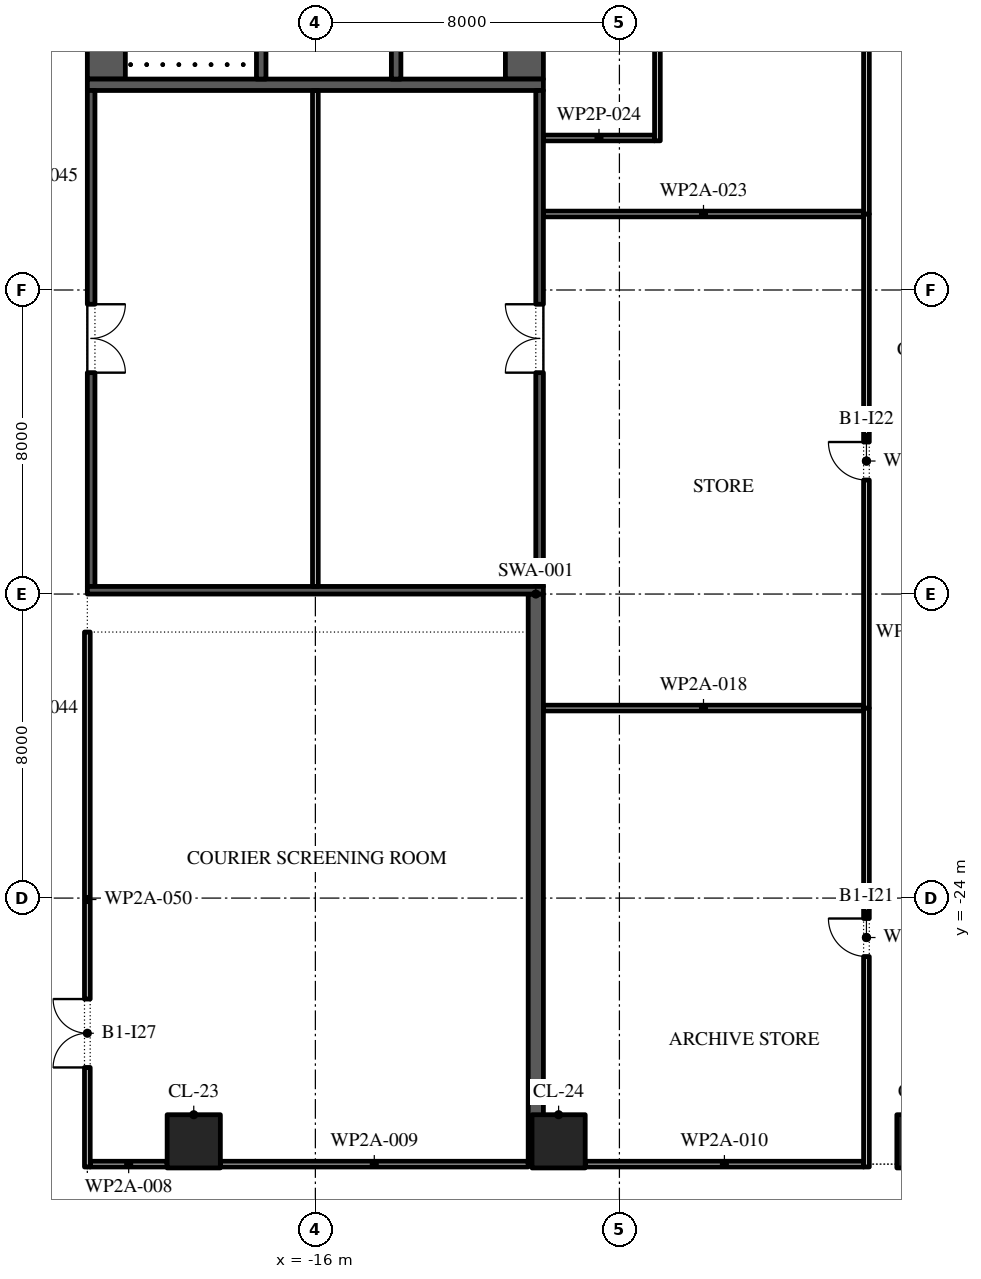
"""IFC4 building model, lengths in metres.
Left out: names, types, materials, properties, quantities, classifications, styles, units other than length and angle.
Written with IfcOpenShell. Run it as: python <this file> out.ifc"""

import sys

from ifc_helpers import new_model, si_unit, direction, frame, frame_2d, origin, origin_2d, place, context, subcontext, project, spatial, rectangle, extrude, element, fill, save


model = new_model("IFC4")
c1 = context("Model", 3, precision=1e-05, world=origin(), true_north=direction((0.0, 1.0)))
c2 = subcontext(c1, "Body", "Model", "MODEL_VIEW")
j1 = project(units=[si_unit("LENGTHUNIT", "METRE"), si_unit("PLANEANGLEUNIT", "RADIAN")], contexts=[c1])
p1 = place(None, origin())
s1 = spatial("IfcSite", under=j1, at=p1, CompositionType="ELEMENT")
p2 = place(p1, origin())
s2 = spatial("IfcBuilding", under=s1, at=p2, CompositionType="ELEMENT")
p3 = place(p2, frame((0.0, 0.0, -5.2)))
s3 = spatial("IfcBuildingStorey", under=s2, at=p3, CompositionType="ELEMENT", Elevation=-5.2)
for number, where, z_axis, x_axis in (
    (1, (-19.2, -30.4, 0.0), (0.0, 0.0, 1.0), (1.0, 0.0, 0.0)),
    (2, (-9.6, -30.4, 0.0), (0.0, 0.0, 1.0), (1.0, 0.0, 0.0)),
    (3, (0.0, -30.4, 0.0), (0.0, 0.0, 1.0), (1.0, 0.0, 0.0)),
):
    element("IfcColumn", number, at=place(p3, frame(where, z_axis=z_axis, x_axis=x_axis)), inside=s3, PredefinedType="COLUMN", context=c2, shape_type="SweptSolid", body=[
        extrude(rectangle(XDim=1.4, YDim=1.4, at=origin_2d()), origin(), (0.0, 0.0, 1.0), 5.2),
    ])
p4 = place(p3, frame((-10.2, -31.0, 0.0), z_axis=(0.0, 0.0, 1.0), x_axis=(0.0, 1.0, 0.0)))
e4 = element("IfcWall", 4, at=p4, inside=s3, PredefinedType="SHEAR", context=c2, shape_type="SweptSolid", body=[
    extrude(rectangle(XDim=15.0, YDim=0.4, at=frame_2d((7.5, 0.0))), origin(), (0.0, 0.0, 1.0), 4.9),
])
p5 = place(p3, frame((-21.5, -2.45, 0.0), z_axis=(0.0, 0.0, 1.0), x_axis=(0.0, 1.0, 0.0)))
e5 = element("IfcWall", 5, at=p5, inside=s3, PredefinedType="SHEAR", context=c2, shape_type="SweptSolid", body=[
    extrude(rectangle(XDim=27.9, YDim=1.0, at=frame_2d((13.95, 0.0))), origin(), (0.0, 0.0, 1.0), 4.9),
])
p6 = place(p5, frame((5.05, 0.0, 0.0)))
e6 = element("IfcOpeningElement", 6, at=p6, cuts=e5, PredefinedType="OPENING", context=c2, shape_type="SweptSolid", body=[
    extrude(rectangle(XDim=1.2, YDim=2.1, at=frame_2d((0.6, 1.05))), frame((0.0, 0.51, 0.0), z_axis=(0.0, -1.0, 0.0), x_axis=(1.0, 0.0, 0.0)), (0.0, 0.0, 1.0), 1.02),
])
p7 = place(p5, frame((21.65, 0.0, 0.0)))
e7 = element("IfcOpeningElement", 7, at=p7, cuts=e5, PredefinedType="OPENING", context=c2, shape_type="SweptSolid", body=[
    extrude(rectangle(XDim=1.2, YDim=2.1, at=frame_2d((0.6, 1.05))), frame((0.0, 0.51, 0.0), z_axis=(0.0, -1.0, 0.0), x_axis=(1.0, 0.0, 0.0)), (0.0, 0.0, 1.0), 1.02),
])
p8 = place(p3, frame((-10.5, -2.45, 0.0), z_axis=(0.0, 0.0, 1.0), x_axis=(0.0, 1.0, 0.0)))
e8 = element("IfcWall", 8, at=p8, inside=s3, PredefinedType="SHEAR", context=c2, shape_type="SweptSolid", body=[
    extrude(rectangle(XDim=27.9, YDim=1.0, at=frame_2d((13.95, 0.0))), origin(), (0.0, 0.0, 1.0), 4.9),
])
p9 = place(p8, frame((23.65, 0.0, 0.0)))
e9 = element("IfcOpeningElement", 9, at=p9, cuts=e8, PredefinedType="OPENING", context=c2, shape_type="SweptSolid", body=[
    extrude(rectangle(XDim=2.4, YDim=2.1, at=frame_2d((1.2, 1.05))), frame((0.0, 0.51, 0.0), z_axis=(0.0, -1.0, 0.0), x_axis=(1.0, 0.0, 0.0)), (0.0, 0.0, 1.0), 1.02),
])
p10 = place(p8, frame((0.788, 0.0, 0.0)))
e10 = element("IfcOpeningElement", 10, at=p10, cuts=e8, PredefinedType="OPENING", context=c2, shape_type="SweptSolid", body=[
    extrude(rectangle(XDim=0.9, YDim=2.1, at=frame_2d((0.45, 1.05))), frame((0.0, 0.51, 0.0), z_axis=(0.0, -1.0, 0.0), x_axis=(1.0, 0.0, 0.0)), (0.0, 0.0, 1.0), 1.02),
])
p11 = place(p8, frame((3.962, 0.0, 0.0)))
e11 = element("IfcOpeningElement", 11, at=p11, cuts=e8, PredefinedType="OPENING", context=c2, shape_type="SweptSolid", body=[
    extrude(rectangle(XDim=1.0, YDim=2.1, at=frame_2d((0.5, 1.05))), frame((0.0, 0.51, 0.0), z_axis=(0.0, -1.0, 0.0), x_axis=(1.0, 0.0, 0.0)), (0.0, 0.0, 1.0), 1.02),
])
p12 = place(p3, frame((-22.0, -2.6, 0.0), z_axis=(0.0, 0.0, 1.0), x_axis=(1.0, 0.0, 0.0)))
e12 = element("IfcWall", 12, at=p12, inside=s3, PredefinedType="SHEAR", context=c2, shape_type="SweptSolid", body=[
    extrude(rectangle(XDim=12.0, YDim=0.3, at=frame_2d((6.0, 0.0))), origin(), (0.0, 0.0, 1.0), 4.9),
])
p13 = place(p3, frame((-17.425, -2.45, 0.0), z_axis=(0.0, 0.0, 1.0), x_axis=(0.0, 1.0, 0.0)))
e13 = element("IfcWall", 13, at=p13, inside=s3, PredefinedType="SHEAR", context=c2, shape_type="SweptSolid", body=[
    extrude(rectangle(XDim=6.3, YDim=0.25, at=frame_2d((3.15, 0.0))), origin(), (0.0, 0.0, 1.0), 4.9),
])
p14 = place(p13, frame((5.05, 0.0, 0.0)))
e14 = element("IfcOpeningElement", 14, at=p14, cuts=e13, PredefinedType="OPENING", context=c2, shape_type="SweptSolid", body=[
    extrude(rectangle(XDim=1.2, YDim=2.1, at=frame_2d((0.6, 1.05))), frame((0.0, 0.135, 0.0), z_axis=(0.0, -1.0, 0.0), x_axis=(1.0, 0.0, 0.0)), (0.0, 0.0, 1.0), 0.27),
])
p15 = place(p3, frame((-13.875, -2.45, 0.0), z_axis=(0.0, 0.0, 1.0), x_axis=(0.0, 1.0, 0.0)))
e15 = element("IfcWall", 15, at=p15, inside=s3, PredefinedType="SHEAR", context=c2, shape_type="SweptSolid", body=[
    extrude(rectangle(XDim=21.3, YDim=0.25, at=frame_2d((10.65, 0.0))), origin(), (0.0, 0.0, 1.0), 4.9),
])
p16 = place(p15, frame((9.946, 0.0, 0.0)))
e16 = element("IfcOpeningElement", 16, at=p16, cuts=e15, PredefinedType="OPENING", context=c2, shape_type="SweptSolid", body=[
    extrude(rectangle(XDim=1.8, YDim=2.4, at=frame_2d((0.9, 1.2))), frame((0.0, 0.135, 0.0), z_axis=(0.0, -1.0, 0.0), x_axis=(1.0, 0.0, 0.0)), (0.0, 0.0, 1.0), 0.27),
])
p17 = place(p15, frame((14.15, 0.0, 0.0)))
e17 = element("IfcOpeningElement", 17, at=p17, cuts=e15, PredefinedType="OPENING", context=c2, shape_type="SweptSolid", body=[
    extrude(rectangle(XDim=1.8, YDim=2.4, at=frame_2d((0.9, 1.2))), frame((0.0, 0.135, 0.0), z_axis=(0.0, -1.0, 0.0), x_axis=(1.0, 0.0, 0.0)), (0.0, 0.0, 1.0), 0.27),
])
p18 = place(p15, frame((18.775, 0.0, 0.0)))
e18 = element("IfcOpeningElement", 18, at=p18, cuts=e15, PredefinedType="OPENING", context=c2, shape_type="SweptSolid", body=[
    extrude(rectangle(XDim=0.9, YDim=2.1, at=frame_2d((0.45, 1.05))), frame((0.0, 0.135, 0.0), z_axis=(0.0, -1.0, 0.0), x_axis=(1.0, 0.0, 0.0)), (0.0, 0.0, 1.0), 0.27),
])
p19 = place(p15, frame((6.971, 0.0, 0.0)))
e19 = element("IfcOpeningElement", 19, at=p19, cuts=e15, PredefinedType="OPENING", context=c2, shape_type="SweptSolid", body=[
    extrude(rectangle(XDim=1.1, YDim=2.1, at=frame_2d((0.55, 1.05))), frame((0.0, 0.135, 0.0), z_axis=(0.0, -1.0, 0.0), x_axis=(1.0, 0.0, 0.0)), (0.0, 0.0, 1.0), 0.27),
])
p20 = place(p3, frame((-21.9, -15.8, 0.0), z_axis=(0.0, 0.0, 1.0), x_axis=(0.0, 1.0, 0.0)))
e20 = element("IfcWall", 20, at=p20, inside=s3, PredefinedType="SHEAR", context=c2, shape_type="SweptSolid", body=[
    extrude(rectangle(XDim=13.05, YDim=0.2, at=frame_2d((6.525, 0.0))), origin(), (0.0, 0.0, 1.0), 4.9),
])
p21 = place(p20, frame((5.625, 0.0, 0.0)))
e21 = element("IfcOpeningElement", 21, at=p21, cuts=e20, PredefinedType="OPENING", context=c2, shape_type="SweptSolid", body=[
    extrude(rectangle(XDim=1.8, YDim=2.4, at=frame_2d((0.9, 1.2))), frame((0.0, 0.11, 0.0), z_axis=(0.0, -1.0, 0.0), x_axis=(1.0, 0.0, 0.0)), (0.0, 0.0, 1.0), 0.22),
])
p22 = place(p3, frame((-10.1, -15.8, 0.0), z_axis=(0.0, 0.0, 1.0), x_axis=(0.0, 1.0, 0.0)))
e22 = element("IfcWall", 22, at=p22, inside=s3, PredefinedType="SHEAR", context=c2, shape_type="SweptSolid", body=[
    extrude(rectangle(XDim=13.05, YDim=0.2, at=frame_2d((6.525, 0.0))), origin(), (0.0, 0.0, 1.0), 4.9),
])
p23 = place(p22, frame((5.625, 0.0, 0.0)))
e23 = element("IfcOpeningElement", 23, at=p23, cuts=e22, PredefinedType="OPENING", context=c2, shape_type="SweptSolid", body=[
    extrude(rectangle(XDim=1.8, YDim=2.4, at=frame_2d((0.9, 1.2))), frame((0.0, 0.11, 0.0), z_axis=(0.0, -1.0, 0.0), x_axis=(1.0, 0.0, 0.0)), (0.0, 0.0, 1.0), 0.22),
])
p24 = place(p3, frame((-22.0, -15.9, 0.0), z_axis=(0.0, 0.0, 1.0), x_axis=(1.0, 0.0, 0.0)))
e24 = element("IfcWall", 24, at=p24, inside=s3, PredefinedType="SHEAR", context=c2, shape_type="SweptSolid", body=[
    extrude(rectangle(XDim=12.0, YDim=0.2, at=frame_2d((6.0, 0.0))), origin(), (0.0, 0.0, 1.0), 4.9),
])
p25 = place(p3, frame((-16.0, -15.8, 0.0), z_axis=(0.0, 0.0, 1.0), x_axis=(0.0, 1.0, 0.0)))
e25 = element("IfcWall", 25, at=p25, inside=s3, PredefinedType="PARTITIONING", context=c2, shape_type="SweptSolid", body=[
    extrude(rectangle(XDim=13.05, YDim=0.15, at=frame_2d((6.525, 0.0))), origin(), (0.0, 0.0, 1.0), 4.9),
])
p26 = place(p3, frame((-21.925, -31.0, 0.0), z_axis=(0.0, 0.0, 1.0), x_axis=(1.0, 0.0, 0.0)))
e26 = element("IfcWall", 26, at=p26, inside=s3, PredefinedType="PARTITIONING", context=c2, shape_type="SweptSolid", body=[
    extrude(rectangle(XDim=2.025, YDim=0.15, at=frame_2d((1.013, 0.0))), origin(), (0.0, 0.0, 1.0), 4.9),
])
p27 = place(p3, frame((-18.5, -31.0, 0.0), z_axis=(0.0, 0.0, 1.0), x_axis=(1.0, 0.0, 0.0)))
e27 = element("IfcWall", 27, at=p27, inside=s3, PredefinedType="PARTITIONING", context=c2, shape_type="SweptSolid", body=[
    extrude(rectangle(XDim=8.1, YDim=0.15, at=frame_2d((4.05, 0.0))), origin(), (0.0, 0.0, 1.0), 4.9),
])
p28 = place(p3, frame((-8.9, -31.0, 0.0), z_axis=(0.0, 0.0, 1.0), x_axis=(1.0, 0.0, 0.0)))
e28 = element("IfcWall", 28, at=p28, inside=s3, PredefinedType="PARTITIONING", context=c2, shape_type="SweptSolid", body=[
    extrude(rectangle(XDim=7.325, YDim=0.15, at=frame_2d((3.663, 0.0))), origin(), (0.0, 0.0, 1.0), 4.9),
])
for number, where, z_axis, x_axis in (
    (29, (-10.0, -19.0, 0.0), (0.0, 0.0, 1.0), (1.0, 0.0, 0.0)),
    (30, (-10.0, -6.0, 0.0), (0.0, 0.0, 1.0), (1.0, 0.0, 0.0)),
):
    element("IfcWall", number, at=place(p3, frame(where, z_axis=z_axis, x_axis=x_axis)), inside=s3, PredefinedType="PARTITIONING", context=c2, shape_type="SweptSolid", body=[
        extrude(rectangle(XDim=8.425, YDim=0.15, at=frame_2d((4.212, 0.0))), origin(), (0.0, 0.0, 1.0), 4.9),
    ])
p29 = place(p3, frame((-10.0, -4.0, 0.0), z_axis=(0.0, 0.0, 1.0), x_axis=(1.0, 0.0, 0.0)))
e31 = element("IfcWall", 31, at=p29, inside=s3, PredefinedType="PARTITIONING", context=c2, shape_type="SweptSolid", body=[
    extrude(rectangle(XDim=2.925, YDim=0.15, at=frame_2d((1.462, 0.0))), origin(), (0.0, 0.0, 1.0), 3.93),
])
p30 = place(p3, frame((-22.0, -31.075, 0.0), z_axis=(0.0, 0.0, 1.0), x_axis=(0.0, 1.0, 0.0)))
e32 = element("IfcWall", 32, at=p30, inside=s3, PredefinedType="PARTITIONING", context=c2, shape_type="SweptSolid", body=[
    extrude(rectangle(XDim=14.075, YDim=0.15, at=frame_2d((7.038, 0.0))), origin(), (0.0, 0.0, 1.0), 4.9),
])
p31 = place(p30, frame((2.619, 0.0, 0.0)))
e33 = element("IfcOpeningElement", 33, at=p31, cuts=e32, PredefinedType="OPENING", context=c2, shape_type="SweptSolid", body=[
    extrude(rectangle(XDim=1.8, YDim=2.1, at=frame_2d((0.9, 1.05))), frame((0.0, 0.085, 0.0), z_axis=(0.0, -1.0, 0.0), x_axis=(1.0, 0.0, 0.0)), (0.0, 0.0, 1.0), 0.17),
])
p32 = place(p3, frame((-7.0, -4.075, 0.0), z_axis=(0.0, 0.0, 1.0), x_axis=(0.0, 1.0, 0.0)))
e34 = element("IfcWall", 34, at=p32, inside=s3, PredefinedType="PARTITIONING", context=c2, shape_type="SweptSolid", body=[
    extrude(rectangle(XDim=29.55, YDim=0.15, at=frame_2d((14.775, 0.0))), origin(), (0.0, 0.0, 1.0), 4.9),
])
p33 = place(p32, frame((13.875, 0.0, 0.0)))
e35 = element("IfcOpeningElement", 35, at=p33, cuts=e34, PredefinedType="OPENING", context=c2, shape_type="SweptSolid", body=[
    extrude(rectangle(XDim=1.8, YDim=2.1, at=frame_2d((0.9, 1.05))), frame((0.0, 0.085, 0.0), z_axis=(0.0, -1.0, 0.0), x_axis=(1.0, 0.0, 0.0)), (0.0, 0.0, 1.0), 0.17),
])
p34 = place(p3, frame((-1.5, -31.075, 0.0), z_axis=(0.0, 0.0, 1.0), x_axis=(0.0, 1.0, 0.0)))
e36 = element("IfcWall", 36, at=p34, inside=s3, PredefinedType="PARTITIONING", context=c2, shape_type="SweptSolid", body=[
    extrude(rectangle(XDim=12.075, YDim=0.15, at=frame_2d((6.038, 0.0))), origin(), (0.0, 0.0, 1.0), 4.9),
])
p35 = place(p34, frame((5.538, 0.0, 0.0)))
e37 = element("IfcOpeningElement", 37, at=p35, cuts=e36, PredefinedType="OPENING", context=c2, shape_type="SweptSolid", body=[
    extrude(rectangle(XDim=1.0, YDim=2.1, at=frame_2d((0.5, 1.05))), frame((0.0, 0.085, 0.0), z_axis=(0.0, -1.0, 0.0), x_axis=(1.0, 0.0, 0.0)), (0.0, 0.0, 1.0), 0.17),
])
p36 = place(p3, frame((-1.5, -19.0, 0.0), z_axis=(0.0, 0.0, 1.0), x_axis=(0.0, 1.0, 0.0)))
e38 = element("IfcWall", 38, at=p36, inside=s3, PredefinedType="PARTITIONING", context=c2, shape_type="SweptSolid", body=[
    extrude(rectangle(XDim=13.0, YDim=0.15, at=frame_2d((6.5, 0.0))), origin(), (0.0, 0.0, 1.0), 4.9),
])
p37 = place(p36, frame((6.0, 0.0, 0.0)))
e39 = element("IfcOpeningElement", 39, at=p37, cuts=e38, PredefinedType="OPENING", context=c2, shape_type="SweptSolid", body=[
    extrude(rectangle(XDim=1.0, YDim=2.1, at=frame_2d((0.5, 1.05))), frame((0.0, 0.085, 0.0), z_axis=(0.0, -1.0, 0.0), x_axis=(1.0, 0.0, 0.0)), (0.0, 0.0, 1.0), 0.17),
])
p38 = place(p3, frame((-1.5, -6.0, 0.0), z_axis=(0.0, 0.0, 1.0), x_axis=(0.0, 1.0, 0.0)))
e40 = element("IfcWall", 40, at=p38, inside=s3, PredefinedType="PARTITIONING", context=c2, shape_type="SweptSolid", body=[
    extrude(rectangle(XDim=31.475, YDim=0.15, at=frame_2d((15.738, 0.0))), origin(), (0.0, 0.0, 1.0), 4.9),
])
p39 = place(p21, frame((1.8, -0.15, 0.0), z_axis=(0.0, 0.0, 1.0), x_axis=(-1.0, 0.0, 0.0)))
e41 = element("IfcDoor", 41, at=p39, inside=s3, OperationType="DOUBLE_DOOR_SINGLE_SWING", PredefinedType="DOOR", context=c2, shape_type="SweptSolid", body=[
    extrude(rectangle(XDim=1.8, YDim=2.4, at=frame_2d((0.9, 1.2))), frame((0.0, -0.05, 0.0), z_axis=(0.0, -1.0, 0.0), x_axis=(1.0, 0.0, 0.0)), (0.0, 0.0, 1.0), 0.05),
])
fill(e21, e41)
p40 = place(p23, origin())
e42 = element("IfcDoor", 42, at=p40, inside=s3, OperationType="DOUBLE_DOOR_SINGLE_SWING", PredefinedType="DOOR", context=c2, shape_type="SweptSolid", body=[
    extrude(rectangle(XDim=1.8, YDim=2.4, at=frame_2d((0.9, 1.2))), frame((0.0, 0.1, 0.0), z_axis=(0.0, -1.0, 0.0), x_axis=(1.0, 0.0, 0.0)), (0.0, 0.0, 1.0), 0.05),
])
fill(e23, e42)
p41 = place(p35, origin())
e43 = element("IfcDoor", 43, at=p41, inside=s3, OperationType="SINGLE_SWING_LEFT", PredefinedType="DOOR", context=c2, shape_type="SweptSolid", body=[
    extrude(rectangle(XDim=1.0, YDim=2.1, at=frame_2d((0.5, 1.05))), frame((0.0, 0.025, 0.0), z_axis=(0.0, -1.0, 0.0), x_axis=(1.0, 0.0, 0.0)), (0.0, 0.0, 1.0), 0.05),
])
fill(e37, e43)
p42 = place(p37, origin())
e44 = element("IfcDoor", 44, at=p42, inside=s3, OperationType="SINGLE_SWING_LEFT", PredefinedType="DOOR", context=c2, shape_type="SweptSolid", body=[
    extrude(rectangle(XDim=1.0, YDim=2.1, at=frame_2d((0.5, 1.05))), frame((0.0, 0.025, 0.0), z_axis=(0.0, -1.0, 0.0), x_axis=(1.0, 0.0, 0.0)), (0.0, 0.0, 1.0), 0.05),
])
fill(e39, e44)
p43 = place(p31, origin())
e45 = element("IfcDoor", 45, at=p43, inside=s3, OperationType="SINGLE_SWING_RIGHT", PredefinedType="DOOR", context=c2, shape_type="SweptSolid", body=[
    extrude(rectangle(XDim=1.8, YDim=2.1, at=frame_2d((0.9, 1.05))), frame((0.0, 0.025, 0.0), z_axis=(0.0, -1.0, 0.0), x_axis=(1.0, 0.0, 0.0)), (0.0, 0.0, 1.0), 0.05),
])
fill(e33, e45)
save(model, sys.argv[1])
